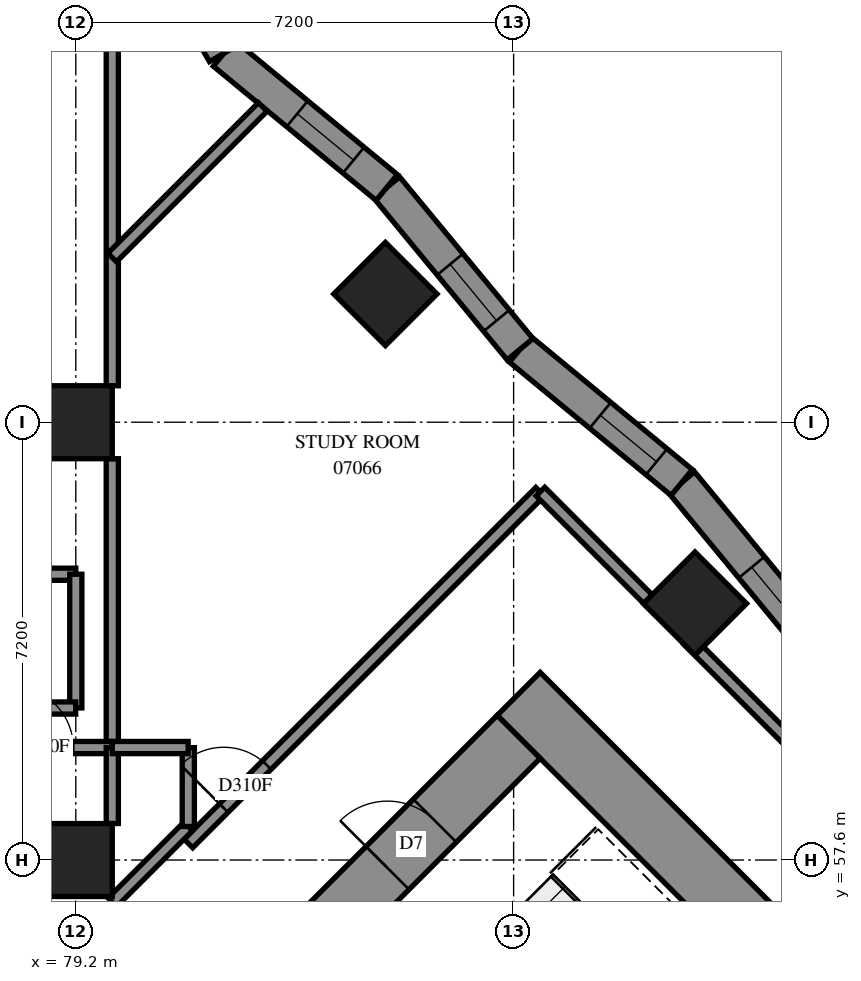
"""IFC4 building model, lengths in metres.
Left out: names, types, materials, properties, quantities, classifications, styles, units other than length and angle.
Written with IfcOpenShell. Run it as: python <this file> out.ifc"""

import sys

from ifc_helpers import new_model, si_unit, direction, frame, frame_2d, origin, origin_2d, place, context, subcontext, project, spatial, polyline, rectangle, outline, extrude, element, fill, save


model = new_model("IFC4")
c1 = context("Model", 3, precision=1e-05, world=origin(), true_north=direction((0.0, 1.0)))
c2 = subcontext(c1, "Body", "Model", "MODEL_VIEW")
j1 = project(units=[si_unit("LENGTHUNIT", "METRE"), si_unit("PLANEANGLEUNIT", "RADIAN")], contexts=[c1])
p1 = place(None, origin())
s1 = spatial("IfcSite", under=j1, at=p1, CompositionType="ELEMENT")
p2 = place(p1, origin())
s2 = spatial("IfcBuilding", under=s1, at=p2, CompositionType="ELEMENT")
p3 = place(p2, frame((0.0, 0.0, 30.4)))
s3 = spatial("IfcBuildingStorey", under=s2, at=p3, CompositionType="ELEMENT", Elevation=30.4)
for number, where, z_axis, x_axis in (
    (1, (79.2, 57.6, 0.0), (0.0, 0.0, 1.0), (1.0, 0.0, 0.0)),
    (2, (79.2, 64.8, 0.0), (0.0, 0.0, 1.0), (1.0, 0.0, 0.0)),
    (3, (84.291, 66.909, 0.0), (0.0, 0.0, 1.0), (0.707, -0.707, 0.0)),
    (4, (89.382, 61.818, 0.0), (0.0, 0.0, 1.0), (0.707, -0.707, 0.0)),
):
    element("IfcColumn", number, at=place(p3, frame(where, z_axis=z_axis, x_axis=x_axis)), inside=s3, PredefinedType="COLUMN", context=c2, shape_type="SweptSolid", body=[
        extrude(rectangle(XDim=1.2, YDim=1.2, at=origin_2d()), origin(), (0.0, 0.0, 1.0), 3.1),
    ])
p4 = place(p3, frame((86.483, 60.333, -0.3), z_axis=(0.0, 0.0, 1.0), x_axis=(0.70710983, -0.7071037324, 0.0)))
e5 = element("IfcWall", 5, at=p4, inside=s3, PredefinedType="SHEAR", context=c2, shape_type="SweptSolid", body=[
    extrude(rectangle(XDim=16.4, YDim=1.0, at=frame_2d((8.2, 0.0))), origin(), (0.0, 0.0, 1.0), 2.7),
])
p5 = place(p4, frame((11.0, 0.0, 0.3)))
e6 = element("IfcOpeningElement", 6, at=p5, cuts=e5, PredefinedType="OPENING", context=c2, shape_type="SweptSolid", body=[
    extrude(rectangle(XDim=0.8, YDim=2.1, at=frame_2d((0.4, 1.05))), frame((0.0, 0.51, 0.0), z_axis=(0.0, -1.0, 0.0), x_axis=(1.0, 0.0, 0.0)), (0.0, 0.0, 1.0), 1.02),
])
p6 = place(p3, frame((76.301, 49.443, -0.3), z_axis=(0.0, 0.0, 1.0), x_axis=(0.7071067812, 0.7071067812, 0.0)))
e7 = element("IfcWall", 7, at=p6, inside=s3, PredefinedType="SHEAR", context=c2, shape_type="SweptSolid", body=[
    extrude(rectangle(XDim=14.4, YDim=1.0, at=frame_2d((7.2, 0.0))), origin(), (0.0, 0.0, 1.0), 2.7),
])
p7 = place(p6, frame((4.55, 0.0, 0.3)))
e8 = element("IfcOpeningElement", 8, at=p7, cuts=e7, PredefinedType="OPENING", context=c2, shape_type="SweptSolid", body=[
    extrude(rectangle(XDim=1.1, YDim=2.1, at=frame_2d((0.55, 1.05))), frame((0.0, 0.51, 0.0), z_axis=(0.0, -1.0, 0.0), x_axis=(1.0, 0.0, 0.0)), (0.0, 0.0, 1.0), 1.02),
])
p8 = place(p6, frame((11.35, 0.0, 0.3)))
e9 = element("IfcOpeningElement", 9, at=p8, cuts=e7, PredefinedType="OPENING", context=c2, shape_type="SweptSolid", body=[
    extrude(rectangle(XDim=1.1, YDim=2.1, at=frame_2d((0.55, 1.05))), frame((0.0, 0.51, 0.0), z_axis=(0.0, -1.0, 0.0), x_axis=(1.0, 0.0, 0.0)), (0.0, 0.0, 1.0), 1.02),
])
p9 = place(p3, frame((91.357, 61.15, 0.0), z_axis=(0.0, 0.0, 1.0), x_axis=(-0.636139456, 0.7715741005, 0.0)))
e10 = element("IfcWall", 10, at=p9, inside=s3, PredefinedType="SOLIDWALL", context=c2, shape_type="SweptSolid", body=[
    extrude(outline(polyline([(0.026, -0.275), (3.472, -0.275), (3.42, 0.275), (-0.026, 0.275), (0.026, -0.275)])), origin(), (0.0, 0.0, 1.0), 3.1),
])
p10 = place(p9, frame((0.439, 0.0, 0.5)))
e11 = element("IfcOpeningElement", 11, at=p10, cuts=e10, PredefinedType="OPENING", context=c2, shape_type="SweptSolid", body=[
    extrude(rectangle(XDim=1.2, YDim=2.45, at=frame_2d((0.6, 1.225))), frame((0.0, 0.285, 0.0), z_axis=(0.0, -1.0, 0.0), x_axis=(1.0, 0.0, 0.0)), (0.0, 0.0, 1.0), 0.57),
])
p11 = place(p3, frame((89.165, 63.809, 0.0), z_axis=(0.0, 0.0, 1.0), x_axis=(-0.7715741005, 0.636139456, 0.0)))
e12 = element("IfcWall", 12, at=p11, inside=s3, PredefinedType="SOLIDWALL", context=c2, shape_type="SweptSolid", body=[
    extrude(outline(polyline([(-0.026, -0.275), (3.42, -0.275), (3.472, 0.275), (0.026, 0.275), (-0.026, -0.275)])), origin(), (0.0, 0.0, 1.0), 3.1),
])
p12 = place(p11, frame((0.537, 0.0, 0.5)))
e13 = element("IfcOpeningElement", 13, at=p12, cuts=e12, PredefinedType="OPENING", context=c2, shape_type="SweptSolid", body=[
    extrude(rectangle(XDim=1.2, YDim=2.45, at=frame_2d((0.6, 1.225))), frame((0.0, 0.285, 0.0), z_axis=(0.0, -1.0, 0.0), x_axis=(1.0, 0.0, 0.0)), (0.0, 0.0, 1.0), 0.57),
])
p13 = place(p3, frame((86.506, 66.001, 0.0), z_axis=(0.0, 0.0, 1.0), x_axis=(-0.6361567317, 0.7715598569, 0.0)))
e14 = element("IfcWall", 14, at=p13, inside=s3, PredefinedType="SOLIDWALL", context=c2, shape_type="SweptSolid", body=[
    extrude(outline(polyline([(0.026, -0.275), (3.472, -0.275), (3.42, 0.275), (-0.026, 0.275), (0.026, -0.275)])), origin(), (0.0, 0.0, 1.0), 3.1),
])
p14 = place(p13, frame((0.609, 0.0, 0.5)))
e15 = element("IfcOpeningElement", 15, at=p14, cuts=e14, PredefinedType="OPENING", context=c2, shape_type="SweptSolid", body=[
    extrude(rectangle(XDim=1.2, YDim=2.45, at=frame_2d((0.6, 1.225))), frame((0.0, 0.285, 0.0), z_axis=(0.0, -1.0, 0.0), x_axis=(1.0, 0.0, 0.0)), (0.0, 0.0, 1.0), 0.57),
])
p15 = place(p3, frame((84.314, 68.659, 0.0), z_axis=(0.0, 0.0, 1.0), x_axis=(-0.7715607103, 0.6361556966, 0.0)))
e16 = element("IfcWall", 16, at=p15, inside=s3, PredefinedType="SOLIDWALL", context=c2, shape_type="SweptSolid", body=[
    extrude(outline(polyline([(-0.026, -0.275), (3.42, -0.275), (3.52, 0.275), (0.026, 0.275), (-0.026, -0.275)])), origin(), (0.0, 0.0, 1.0), 3.1),
])
p16 = place(p15, frame((0.708, 0.0, 0.5)))
e17 = element("IfcOpeningElement", 17, at=p16, cuts=e16, PredefinedType="OPENING", context=c2, shape_type="SweptSolid", body=[
    extrude(rectangle(XDim=1.2, YDim=2.45, at=frame_2d((0.6, 1.225))), frame((0.0, 0.285, 0.0), z_axis=(0.0, -1.0, 0.0), x_axis=(1.0, 0.0, 0.0)), (0.0, 0.0, 1.0), 0.57),
])
p17 = place(p3, frame((81.637, 70.867, 0.0), z_axis=(0.0, 0.0, 1.0), x_axis=(-0.497425467, 0.8675067174, 0.0)))
e18 = element("IfcWall", 18, at=p17, inside=s3, PredefinedType="SOLIDWALL", context=c2, shape_type="SweptSolid", body=[
    extrude(outline(polyline([(0.05, -0.275), (3.604, -0.275), (3.19, 0.275), (-0.05, 0.275), (0.05, -0.275)])), origin(), (0.0, 0.0, 1.0), 3.1),
])
p18 = place(p17, frame((0.808, 0.0, 0.5)))
e19 = element("IfcOpeningElement", 19, at=p18, cuts=e18, PredefinedType="OPENING", context=c2, shape_type="SweptSolid", body=[
    extrude(rectangle(XDim=1.2, YDim=2.45, at=frame_2d((0.6, 1.225))), frame((0.0, 0.285, 0.0), z_axis=(0.0, -1.0, 0.0), x_axis=(1.0, 0.0, 0.0)), (0.0, 0.0, 1.0), 0.57),
])
p19 = place(p3, frame((81.052, 57.873, 0.0), z_axis=(0.0, 0.0, 1.0), x_axis=(0.7071067812, 0.7071067812, 0.0)))
e20 = element("IfcWall", 20, at=p19, inside=s3, PredefinedType="PARTITIONING", context=c2, shape_type="SweptSolid", body=[
    extrude(rectangle(XDim=8.18, YDim=0.2, at=frame_2d((4.09, 0.0))), origin(), (0.0, 0.0, 1.0), 3.1),
])
p20 = place(p19, frame((0.823, 0.0, 0.0)))
e21 = element("IfcOpeningElement", 21, at=p20, cuts=e20, PredefinedType="OPENING", context=c2, shape_type="SweptSolid", body=[
    extrude(rectangle(XDim=1.0, YDim=2.1, at=frame_2d((0.5, 1.05))), frame((0.0, 0.11, 0.0), z_axis=(0.0, -1.0, 0.0), x_axis=(1.0, 0.0, 0.0)), (0.0, 0.0, 1.0), 0.22),
])
p21 = place(p3, frame((89.271, 61.215, 0.0), z_axis=(0.0, 0.0, 1.0), x_axis=(0.7071067812, -0.7071067812, 0.0)))
e22 = element("IfcWall", 22, at=p21, inside=s3, PredefinedType="PARTITIONING", context=c2, shape_type="SweptSolid", body=[
    extrude(rectangle(XDim=6.505, YDim=0.2, at=frame_2d((3.253, 0.0))), origin(), (0.0, 0.0, 1.0), 3.1),
])
p22 = place(p3, frame((79.8, 65.4, 0.0), z_axis=(0.0, 0.0, 1.0), x_axis=(0.0, 1.0, 0.0)))
e23 = element("IfcWall", 23, at=p22, inside=s3, PredefinedType="PARTITIONING", context=c2, shape_type="SweptSolid", body=[
    extrude(rectangle(XDim=6.0, YDim=0.2, at=frame_2d((3.0, 0.0))), origin(), (0.0, 0.0, 1.0), 3.1),
])
p23 = place(p3, frame((79.8, 59.45, 0.0), z_axis=(0.0, 0.0, 1.0), x_axis=(0.0, 1.0, 0.0)))
e24 = element("IfcWall", 24, at=p23, inside=s3, PredefinedType="PARTITIONING", context=c2, shape_type="SweptSolid", body=[
    extrude(rectangle(XDim=4.75, YDim=0.2, at=frame_2d((2.375, 0.0))), origin(), (0.0, 0.0, 1.0), 3.1),
])
p24 = place(p3, frame((75.102, 62.3, 0.0), z_axis=(0.0, 0.0, 1.0), x_axis=(1.0, 0.0, 0.0)))
e25 = element("IfcWall", 25, at=p24, inside=s3, PredefinedType="PARTITIONING", context=c2, shape_type="SweptSolid", body=[
    extrude(rectangle(XDim=4.098, YDim=0.2, at=frame_2d((2.049, 0.0))), origin(), (0.0, 0.0, 1.0), 3.1),
])
p25 = place(p3, frame((79.799, 67.509, 0.0), z_axis=(0.0, 0.0, 1.0), x_axis=(0.7070924981, 0.707121064, 0.0)))
e26 = element("IfcWall", 26, at=p25, inside=s3, PredefinedType="PARTITIONING", context=c2, shape_type="SweptSolid", body=[
    extrude(rectangle(XDim=3.501, YDim=0.2, at=frame_2d((1.75, 0.0))), origin(), (0.0, 0.0, 1.0), 3.1),
])
p26 = place(p3, frame((86.841, 63.659, 0.0), z_axis=(0.0, 0.0, 1.0), x_axis=(0.7067795096, -0.7074339014, 0.0)))
e27 = element("IfcWall", 27, at=p26, inside=s3, PredefinedType="PARTITIONING", context=c2, shape_type="SweptSolid", body=[
    extrude(rectangle(XDim=2.751, YDim=0.2, at=frame_2d((1.375, 0.0))), origin(), (0.0, 0.0, 1.0), 3.1),
])
p27 = place(p3, frame((79.2, 60.102, 0.0), z_axis=(0.0, 0.0, 1.0), x_axis=(0.0, 1.0, 0.0)))
e28 = element("IfcWall", 28, at=p27, inside=s3, PredefinedType="PARTITIONING", context=c2, shape_type="SweptSolid", body=[
    extrude(rectangle(XDim=2.198, YDim=0.2, at=frame_2d((1.099, 0.0))), origin(), (0.0, 0.0, 1.0), 3.1),
])
p28 = place(p3, frame((77.384, 60.1, 0.0), z_axis=(0.0, 0.0, 1.0), x_axis=(1.0, 0.0, 0.0)))
e29 = element("IfcWall", 29, at=p28, inside=s3, PredefinedType="PARTITIONING", context=c2, shape_type="SweptSolid", body=[
    extrude(rectangle(XDim=1.814, YDim=0.2, at=frame_2d((0.907, 0.0))), origin(), (0.0, 0.0, 1.0), 3.1),
])
p29 = place(p3, frame((78.032, 59.45, 0.0), z_axis=(0.0, 0.0, 1.0), x_axis=(1.0, 0.0, 0.0)))
e30 = element("IfcWall", 30, at=p29, inside=s3, PredefinedType="PARTITIONING", context=c2, shape_type="SweptSolid", body=[
    extrude(rectangle(XDim=1.768, YDim=0.2, at=frame_2d((0.884, 0.0))), origin(), (0.0, 0.0, 1.0), 3.1),
])
p30 = place(p29, frame((0.126, 0.0, 0.0)))
e31 = element("IfcOpeningElement", 31, at=p30, cuts=e30, PredefinedType="OPENING", context=c2, shape_type="SweptSolid", body=[
    extrude(rectangle(XDim=1.0, YDim=2.1, at=frame_2d((0.5, 1.05))), frame((0.0, 0.11, 0.0), z_axis=(0.0, -1.0, 0.0), x_axis=(1.0, 0.0, 0.0)), (0.0, 0.0, 1.0), 0.22),
])
p31 = place(p3, frame((79.801, 56.905, 0.0), z_axis=(0.0, 0.0, 1.0), x_axis=(0.7071067812, 0.7071067812, 0.0)))
e32 = element("IfcWall", 32, at=p31, inside=s3, PredefinedType="PARTITIONING", context=c2, shape_type="SweptSolid", body=[
    extrude(rectangle(XDim=1.765, YDim=0.2, at=frame_2d((0.882, 0.0))), origin(), (0.0, 0.0, 1.0), 3.1),
])
p32 = place(p3, frame((81.05, 58.152, 0.0), z_axis=(0.0, 0.0, 1.0), x_axis=(0.0, 1.0, 0.0)))
e33 = element("IfcWall", 33, at=p32, inside=s3, PredefinedType="PARTITIONING", context=c2, shape_type="SweptSolid", body=[
    extrude(rectangle(XDim=1.296, YDim=0.2, at=frame_2d((0.648, 0.0))), origin(), (0.0, 0.0, 1.0), 3.1),
])
p33 = place(p3, frame((79.8, 58.2, 0.0), z_axis=(0.0, 0.0, 1.0), x_axis=(0.0, 1.0, 0.0)))
e34 = element("IfcWall", 34, at=p33, inside=s3, PredefinedType="PARTITIONING", context=c2, shape_type="SweptSolid", body=[
    extrude(rectangle(XDim=1.25, YDim=0.2, at=frame_2d((0.625, 0.0))), origin(), (0.0, 0.0, 1.0), 3.1),
])
p34 = place(p3, frame((79.8, 59.45, 0.0), z_axis=(0.0, 0.0, 1.0), x_axis=(1.0, 0.0, 0.0)))
e35 = element("IfcWall", 35, at=p34, inside=s3, PredefinedType="PARTITIONING", context=c2, shape_type="SweptSolid", body=[
    extrude(rectangle(XDim=1.248, YDim=0.2, at=frame_2d((0.624, 0.0))), origin(), (0.0, 0.0, 1.0), 3.1),
])
p35 = place(p10, origin())
e36 = element("IfcWindow", 36, at=p35, inside=s3, PartitioningType="SINGLE_PANEL", PredefinedType="WINDOW", context=c2, shape_type="SweptSolid", body=[
    extrude(rectangle(XDim=1.2, YDim=2.45, at=frame_2d((0.6, 1.225))), frame((0.0, 0.155, 0.0), z_axis=(0.0, -1.0, 0.0), x_axis=(1.0, 0.0, 0.0)), (0.0, 0.0, 1.0), 0.06),
])
fill(e11, e36)
p36 = place(p12, origin())
e37 = element("IfcWindow", 37, at=p36, inside=s3, PartitioningType="SINGLE_PANEL", PredefinedType="WINDOW", context=c2, shape_type="SweptSolid", body=[
    extrude(rectangle(XDim=1.2, YDim=2.45, at=frame_2d((0.6, 1.225))), frame((0.0, 0.155, 0.0), z_axis=(0.0, -1.0, 0.0), x_axis=(1.0, 0.0, 0.0)), (0.0, 0.0, 1.0), 0.06),
])
fill(e13, e37)
p37 = place(p14, origin())
e38 = element("IfcWindow", 38, at=p37, inside=s3, PartitioningType="SINGLE_PANEL", PredefinedType="WINDOW", context=c2, shape_type="SweptSolid", body=[
    extrude(rectangle(XDim=1.2, YDim=2.45, at=frame_2d((0.6, 1.225))), frame((0.0, 0.155, 0.0), z_axis=(0.0, -1.0, 0.0), x_axis=(1.0, 0.0, 0.0)), (0.0, 0.0, 1.0), 0.06),
])
fill(e15, e38)
p38 = place(p16, origin())
e39 = element("IfcWindow", 39, at=p38, inside=s3, PartitioningType="SINGLE_PANEL", PredefinedType="WINDOW", context=c2, shape_type="SweptSolid", body=[
    extrude(rectangle(XDim=1.2, YDim=2.45, at=frame_2d((0.6, 1.225))), frame((0.0, 0.155, 0.0), z_axis=(0.0, -1.0, 0.0), x_axis=(1.0, 0.0, 0.0)), (0.0, 0.0, 1.0), 0.06),
])
fill(e17, e39)
p39 = place(p8, origin())
e40 = element("IfcDoor", 40, at=p39, inside=s3, OperationType="SINGLE_SWING_LEFT", PredefinedType="DOOR", context=c2, shape_type="SweptSolid", body=[
    extrude(rectangle(XDim=1.1, YDim=2.1, at=frame_2d((0.55, 1.05))), frame((0.0, 0.025, 0.0), z_axis=(0.0, -1.0, 0.0), x_axis=(1.0, 0.0, 0.0)), (0.0, 0.0, 1.0), 0.05),
])
fill(e9, e40)
p40 = place(p30, origin())
e41 = element("IfcDoor", 41, at=p40, inside=s3, OperationType="SINGLE_SWING_LEFT", PredefinedType="DOOR", context=c2, shape_type="SweptSolid", body=[
    extrude(rectangle(XDim=1.0, YDim=2.1, at=frame_2d((0.5, 1.05))), frame((0.0, 0.025, 0.0), z_axis=(0.0, -1.0, 0.0), x_axis=(1.0, 0.0, 0.0)), (0.0, 0.0, 1.0), 0.05),
])
fill(e31, e41)
p41 = place(p20, origin())
e42 = element("IfcDoor", 42, at=p41, inside=s3, OperationType="SINGLE_SWING_RIGHT", PredefinedType="DOOR", context=c2, shape_type="SweptSolid", body=[
    extrude(rectangle(XDim=1.0, YDim=2.1, at=frame_2d((0.5, 1.05))), frame((0.0, 0.025, 0.0), z_axis=(0.0, -1.0, 0.0), x_axis=(1.0, 0.0, 0.0)), (0.0, 0.0, 1.0), 0.05),
])
fill(e21, e42)
save(model, sys.argv[1])
